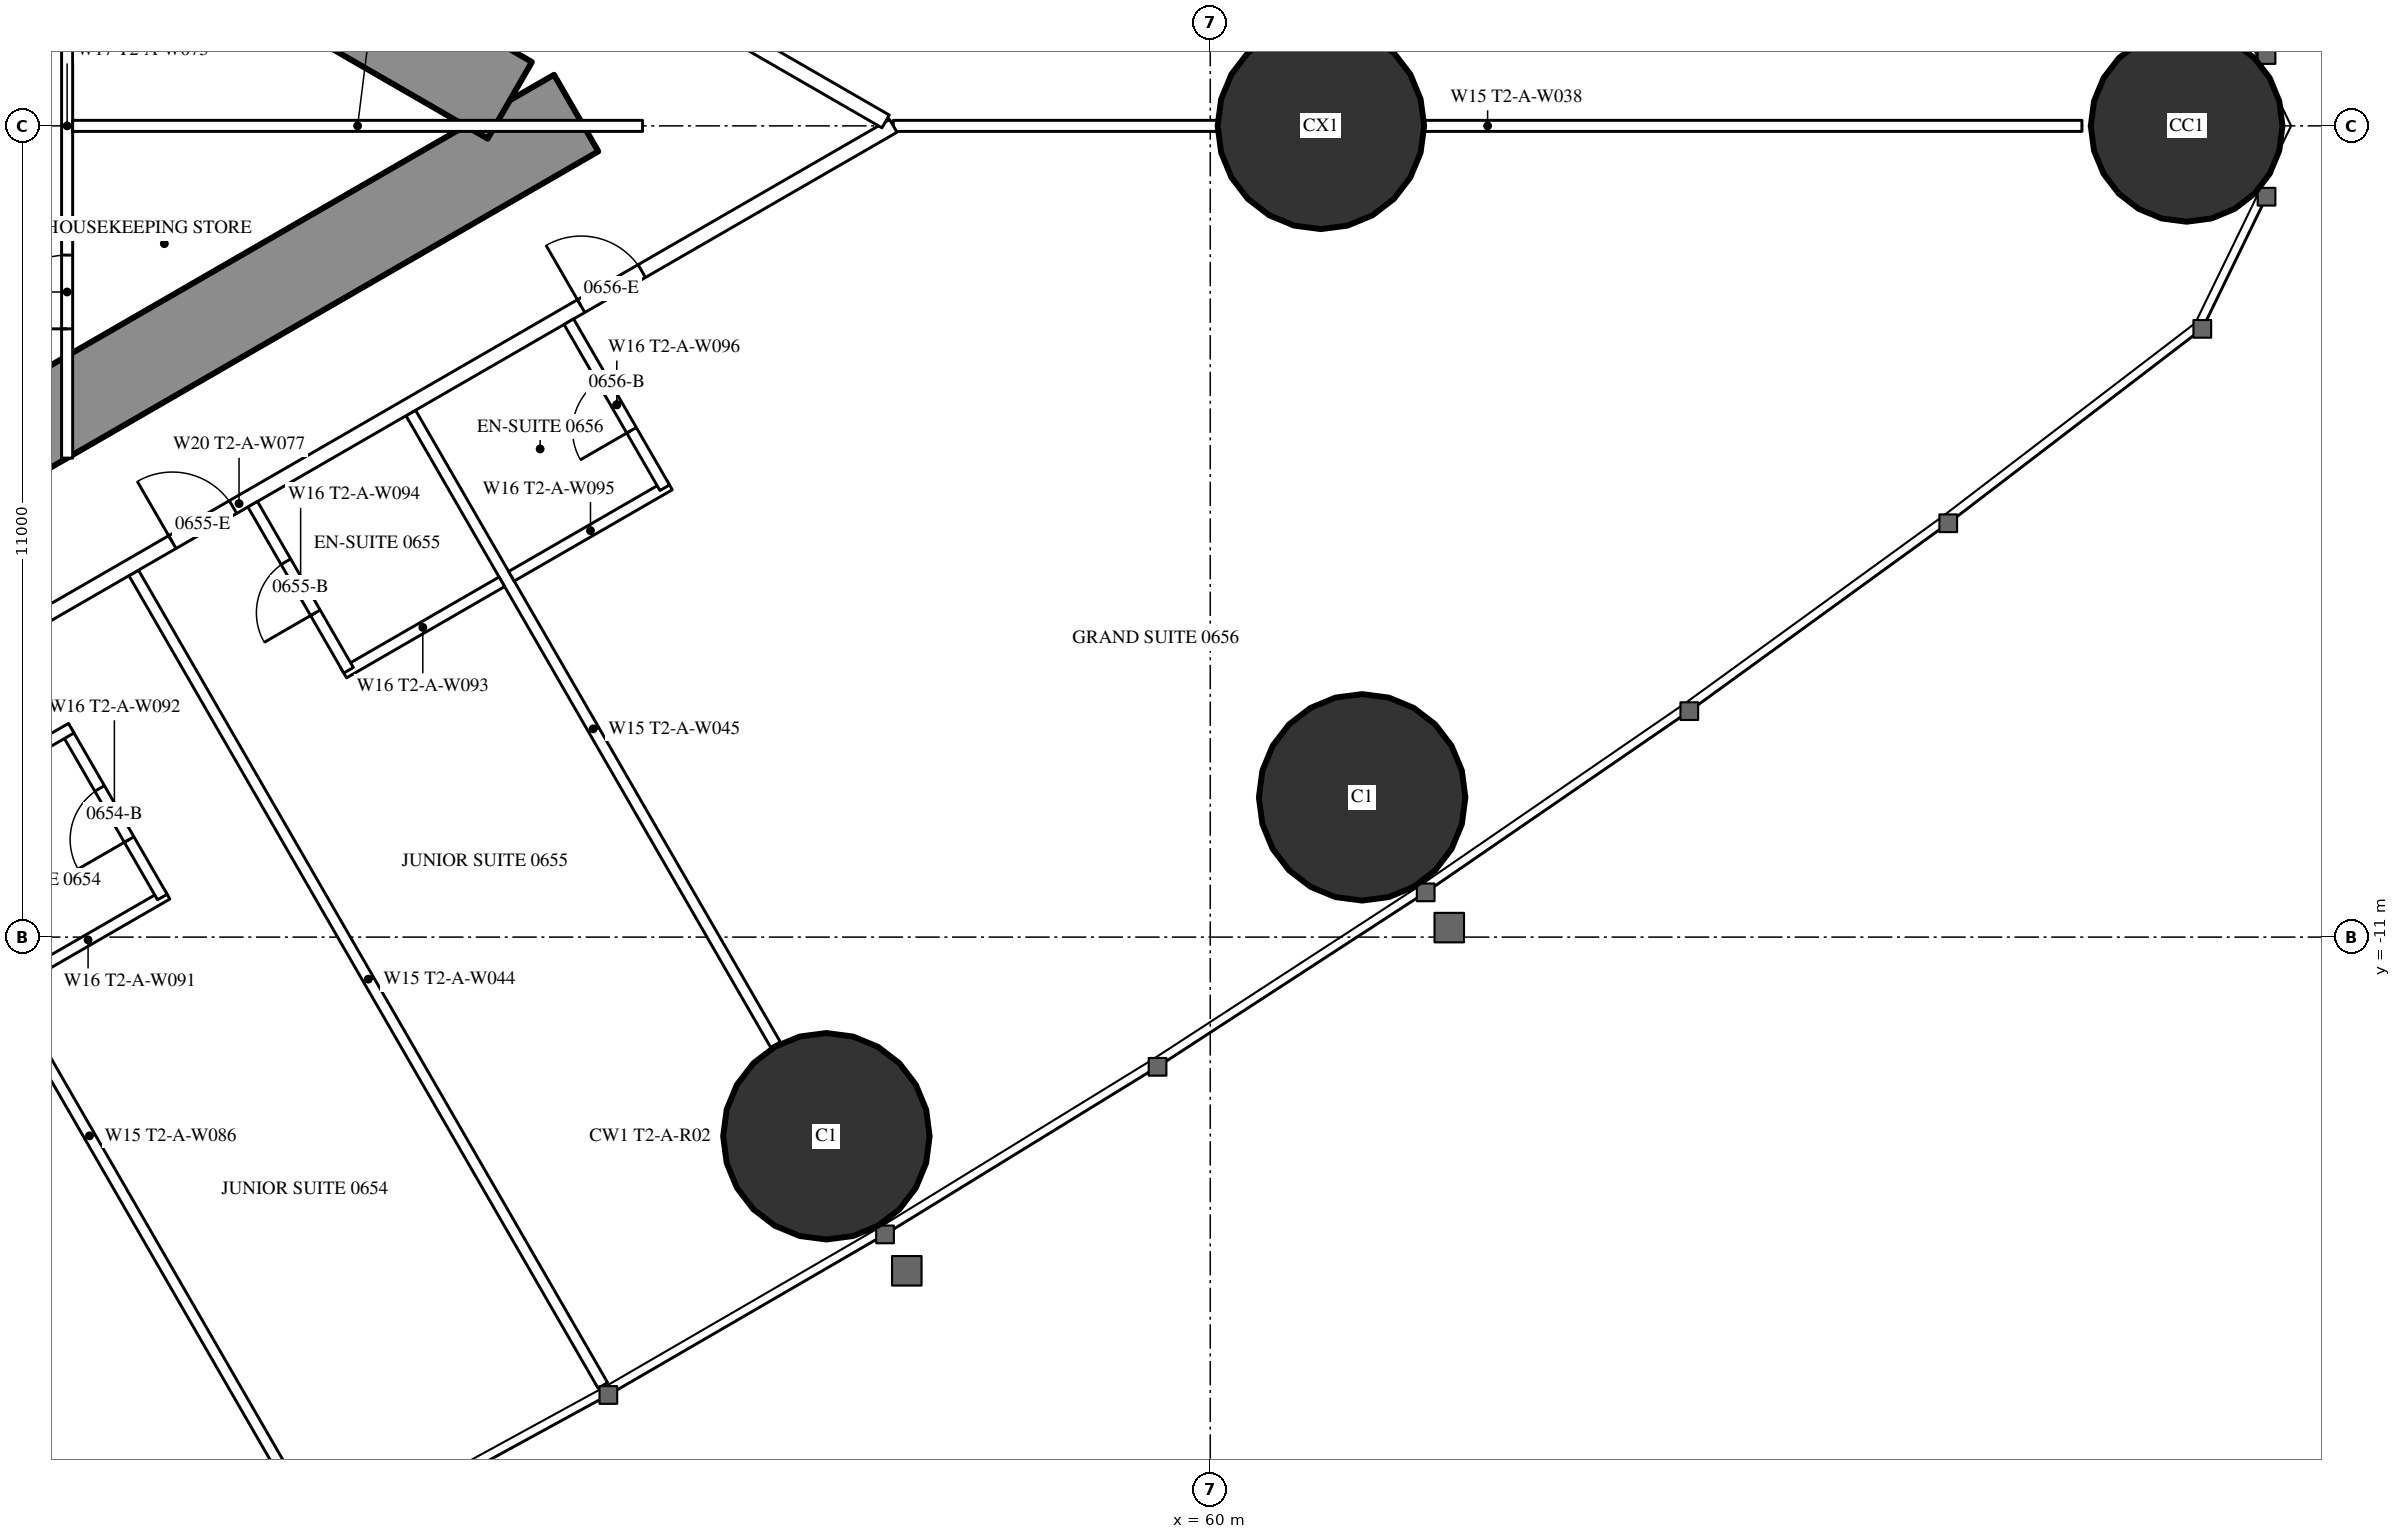
"""IFC4 building model, lengths in metres.
Left out: names, types, materials, properties, quantities, classifications, styles, units other than length and angle.
Written with IfcOpenShell. Run it as: python <this file> out.ifc"""

import sys

from ifc_helpers import new_model, si_unit, direction, frame, frame_2d, origin, origin_2d, place, context, subcontext, project, spatial, rectangle, hollow_circle, extrude, element, fill, save


model = new_model("IFC4")
c1 = context("Model", 3, precision=1e-05, world=origin(), true_north=direction((0.0, 1.0)))
c2 = subcontext(c1, "Body", "Model", "MODEL_VIEW")
j1 = project(units=[si_unit("LENGTHUNIT", "METRE"), si_unit("PLANEANGLEUNIT", "RADIAN")], contexts=[c1])
p1 = place(None, origin())
s1 = spatial("IfcSite", under=j1, at=p1, CompositionType="ELEMENT")
p2 = place(p1, origin())
s2 = spatial("IfcBuilding", under=s1, at=p2, CompositionType="ELEMENT")
p3 = place(p2, frame((0.0, 0.0, 28.5)))
s3 = spatial("IfcBuildingStorey", under=s2, at=p3, CompositionType="ELEMENT", Elevation=28.5)
p4 = place(p3, frame((73.239, 0.0, 0.0), z_axis=(0.0, 0.0, 1.0), x_axis=(1.0, 0.0, 0.0)))
e1 = element("IfcColumn", 1, at=p4, inside=s3, PredefinedType="COLUMN", context=c2, shape_type="SweptSolid", body=[
    extrude(hollow_circle(Radius=1.3, WallThickness=0.1, at=origin_2d()), origin(), (0.0, 0.0, 1.0), 3.5),
])
for number, where, z_axis, x_axis in (
    (2, (54.795, -13.701, 0.0), (0.0, 0.0, 1.0), (1.0, 0.0, 0.0)),
    (3, (62.059, -9.105, 0.0), (0.0, 0.0, 1.0), (1.0, 0.0, 0.0)),
):
    element("IfcColumn", number, at=place(p3, frame(where, z_axis=z_axis, x_axis=x_axis)), inside=s3, PredefinedType="COLUMN", context=c2, shape_type="SweptSolid", body=[
        extrude(hollow_circle(Radius=1.4, WallThickness=0.12, at=origin_2d()), origin(), (0.0, 0.0, 1.0), 3.5),
    ])
p5 = place(p3, frame((61.5, 0.0, 0.0), z_axis=(0.0, 0.0, 1.0), x_axis=(1.0, 0.0, 0.0)))
e4 = element("IfcColumn", 4, at=p5, inside=s3, PredefinedType="COLUMN", context=c2, shape_type="SweptSolid", body=[
    extrude(hollow_circle(Radius=1.4, WallThickness=0.1, at=origin_2d()), origin(), (0.0, 0.0, 1.0), 3.5),
])
p6 = place(p3, frame((27.2, -13.8, 0.0), z_axis=(0.0, 0.0, 1.0), x_axis=(0.866027159892, 0.499996958321, 0.0)))
e5 = element("IfcWall", 5, at=p6, inside=s3, PredefinedType="SHEAR", context=c2, shape_type="SweptSolid", body=[
    extrude(rectangle(XDim=27.947, YDim=1.2, at=frame_2d((13.973, 0.0))), origin(), (0.0, 0.0, 1.0), 3.5),
])
p7 = place(p6, frame((4.6, 0.0, 0.0)))
e6 = element("IfcOpeningElement", 6, at=p7, cuts=e5, PredefinedType="OPENING", context=c2, shape_type="SweptSolid", body=[
    extrude(rectangle(XDim=1.0, YDim=2.2, at=frame_2d((0.5, 1.1))), frame((0.0, 0.61, 0.0), z_axis=(0.0, -1.0, 0.0), x_axis=(1.0, 0.0, 0.0)), (0.0, 0.0, 1.0), 1.22),
])
p8 = place(p6, frame((13.395, 0.0, 0.0)))
e7 = element("IfcOpeningElement", 7, at=p8, cuts=e5, PredefinedType="OPENING", context=c2, shape_type="SweptSolid", body=[
    extrude(rectangle(XDim=1.8, YDim=2.2, at=frame_2d((0.9, 1.1))), frame((0.0, 0.61, 0.0), z_axis=(0.0, -1.0, 0.0), x_axis=(1.0, 0.0, 0.0)), (0.0, 0.0, 1.0), 1.22),
])
p9 = place(p3, frame((27.2, 13.8, 0.0), z_axis=(0.0, 0.0, 1.0), x_axis=(0.866024515034, -0.500001539357, 0.0)))
e8 = element("IfcWall", 8, at=p9, inside=s3, PredefinedType="SHEAR", context=c2, shape_type="SweptSolid", body=[
    extrude(rectangle(XDim=26.907, YDim=1.2, at=frame_2d((13.454, 0.0))), origin(), (0.0, 0.0, 1.0), 3.5),
])
p10 = place(p9, frame((4.6, 0.0, 0.0)))
e9 = element("IfcOpeningElement", 9, at=p10, cuts=e8, PredefinedType="OPENING", context=c2, shape_type="SweptSolid", body=[
    extrude(rectangle(XDim=1.0, YDim=2.2, at=frame_2d((0.5, 1.1))), frame((0.0, 0.61, 0.0), z_axis=(0.0, -1.0, 0.0), x_axis=(1.0, 0.0, 0.0)), (0.0, 0.0, 1.0), 1.22),
])
p11 = place(p9, frame((13.395, 0.0, 0.0)))
e10 = element("IfcOpeningElement", 10, at=p11, cuts=e8, PredefinedType="OPENING", context=c2, shape_type="SweptSolid", body=[
    extrude(rectangle(XDim=1.8, YDim=2.2, at=frame_2d((0.9, 1.1))), frame((0.0, 0.61, 0.0), z_axis=(0.0, -1.0, 0.0), x_axis=(1.0, 0.0, 0.0)), (0.0, 0.0, 1.0), 1.22),
])
p12 = place(p3, frame((41.647, -8.23, 0.0), z_axis=(0.0, 0.0, 1.0), x_axis=(0.49998590462, -0.866033541603, 0.0)))
e11 = element("IfcWall", 11, at=p12, inside=s3, PredefinedType="PARTITIONING", context=c2, shape_type="SweptSolid", body=[
    extrude(rectangle(XDim=12.621, YDim=0.15, at=frame_2d((6.311, 0.0))), origin(), (0.0, 0.0, 1.0), 3.25),
])
p13 = place(p3, frame((45.403, -6.062, 0.0), z_axis=(0.0, 0.0, 1.0), x_axis=(0.500007077968, -0.866021317279, 0.0)))
e12 = element("IfcWall", 12, at=p13, inside=s3, PredefinedType="PARTITIONING", context=c2, shape_type="SweptSolid", body=[
    extrude(rectangle(XDim=12.721, YDim=0.15, at=frame_2d((6.361, 0.0))), origin(), (0.0, 0.0, 1.0), 3.25),
])
p14 = place(p3, frame((49.159, -3.893, 0.0), z_axis=(0.0, 0.0, 1.0), x_axis=(0.499998773722, -0.866026111775, 0.0)))
e13 = element("IfcWall", 13, at=p14, inside=s3, PredefinedType="PARTITIONING", context=c2, shape_type="SweptSolid", body=[
    extrude(rectangle(XDim=9.892, YDim=0.15, at=frame_2d((4.946, 0.0))), origin(), (0.0, 0.0, 1.0), 2.25),
])
p15 = place(p3, frame((55.702, 0.0, 0.0), z_axis=(0.0, 0.0, 1.0), x_axis=(1.0, 0.0, 0.0)))
e14 = element("IfcWall", 14, at=p15, inside=s3, PredefinedType="PARTITIONING", context=c2, shape_type="SweptSolid", body=[
    extrude(rectangle(XDim=16.117, YDim=0.15, at=frame_2d((8.059, 0.0))), origin(), (0.0, 0.0, 1.0), 2.25),
])
p16 = place(p3, frame((37.96, -10.243, 0.0), z_axis=(0.0, 0.0, 1.0), x_axis=(0.866026429433, 0.499998223521, 0.0)))
e15 = element("IfcWall", 15, at=p16, inside=s3, PredefinedType="PARTITIONING", context=c2, shape_type="SweptSolid", body=[
    extrude(rectangle(XDim=20.487, YDim=0.2, at=frame_2d((10.243, 0.0))), origin(), (0.0, 0.0, 1.0), 3.25),
])
p17 = place(p16, frame((4.575, 0.0, 0.0)))
e16 = element("IfcOpeningElement", 16, at=p17, cuts=e15, PredefinedType="OPENING", context=c2, shape_type="SweptSolid", body=[
    extrude(rectangle(XDim=0.95, YDim=2.2, at=frame_2d((0.475, 1.1))), frame((0.0, 0.11, 0.0), z_axis=(0.0, -1.0, 0.0), x_axis=(1.0, 0.0, 0.0)), (0.0, 0.0, 1.0), 0.22),
])
p18 = place(p16, frame((9.199, 0.0, 0.0)))
e17 = element("IfcOpeningElement", 17, at=p18, cuts=e15, PredefinedType="OPENING", context=c2, shape_type="SweptSolid", body=[
    extrude(rectangle(XDim=0.95, YDim=2.2, at=frame_2d((0.475, 1.1))), frame((0.0, 0.11, 0.0), z_axis=(0.0, -1.0, 0.0), x_axis=(1.0, 0.0, 0.0)), (0.0, 0.0, 1.0), 0.22),
])
p19 = place(p16, frame((15.599, 0.0, 0.0)))
e18 = element("IfcOpeningElement", 18, at=p19, cuts=e15, PredefinedType="OPENING", context=c2, shape_type="SweptSolid", body=[
    extrude(rectangle(XDim=0.95, YDim=2.2, at=frame_2d((0.475, 1.1))), frame((0.0, 0.11, 0.0), z_axis=(0.0, -1.0, 0.0), x_axis=(1.0, 0.0, 0.0)), (0.0, 0.0, 1.0), 0.22),
])
p20 = place(p16, frame((2.875, 0.0, 0.0)))
e19 = element("IfcOpeningElement", 19, at=p20, cuts=e15, PredefinedType="OPENING", context=c2, shape_type="SweptSolid", body=[
    extrude(rectangle(XDim=0.95, YDim=2.2, at=frame_2d((0.475, 1.1))), frame((0.0, 0.11, 0.0), z_axis=(0.0, -1.0, 0.0), x_axis=(1.0, 0.0, 0.0)), (0.0, 0.0, 1.0), 0.22),
])
p21 = place(p3, frame((41.619, 8.131, 0.0), z_axis=(0.0, 0.0, 1.0), x_axis=(0.86603245327, -0.499987789734, 0.0)))
e20 = element("IfcWall", 20, at=p21, inside=s3, PredefinedType="PARTITIONING", context=c2, shape_type="SweptSolid", body=[
    extrude(rectangle(XDim=16.142, YDim=0.2, at=frame_2d((8.071, 0.0))), origin(), (0.0, 0.0, 1.0), 3.25),
])
p22 = place(p21, frame((9.024, 0.0, 0.0)))
e21 = element("IfcOpeningElement", 21, at=p22, cuts=e20, PredefinedType="OPENING", context=c2, shape_type="SweptSolid", body=[
    extrude(rectangle(XDim=0.95, YDim=2.2, at=frame_2d((0.475, 1.1))), frame((0.0, 0.11, 0.0), z_axis=(0.0, -1.0, 0.0), x_axis=(1.0, 0.0, 0.0)), (0.0, 0.0, 1.0), 0.22),
])
p23 = place(p21, frame((7.037, 0.0, 0.0)))
e22 = element("IfcOpeningElement", 22, at=p23, cuts=e20, PredefinedType="OPENING", context=c2, shape_type="SweptSolid", body=[
    extrude(rectangle(XDim=0.95, YDim=2.2, at=frame_2d((0.475, 1.1))), frame((0.0, 0.11, 0.0), z_axis=(0.0, -1.0, 0.0), x_axis=(1.0, 0.0, 0.0)), (0.0, 0.0, 1.0), 0.22),
])
p24 = place(p21, frame((2.987, 0.0, 0.0)))
e23 = element("IfcOpeningElement", 23, at=p24, cuts=e20, PredefinedType="OPENING", context=c2, shape_type="SweptSolid", body=[
    extrude(rectangle(XDim=0.95, YDim=2.2, at=frame_2d((0.475, 1.1))), frame((0.0, 0.11, 0.0), z_axis=(0.0, -1.0, 0.0), x_axis=(1.0, 0.0, 0.0)), (0.0, 0.0, 1.0), 0.22),
])
p25 = place(p3, frame((43.712, -11.657, 0.0), z_axis=(0.0, 0.0, 1.0), x_axis=(0.866006523861, 0.500032699561, 0.0)))
e24 = element("IfcWall", 24, at=p25, inside=s3, PredefinedType="PARTITIONING", context=c2, shape_type="SweptSolid", body=[
    extrude(rectangle(XDim=2.475, YDim=0.15, at=frame_2d((1.237, 0.0))), origin(), (0.0, 0.0, 1.0), 3.25),
])
p26 = place(p3, frame((44.491, -8.205, 0.0), z_axis=(0.0, 0.0, 1.0), x_axis=(0.500047596559, -0.865997922154, 0.0)))
e25 = element("IfcWall", 25, at=p26, inside=s3, PredefinedType="PARTITIONING", context=c2, shape_type="SweptSolid", body=[
    extrude(rectangle(XDim=2.6, YDim=0.15, at=frame_2d((1.3, 0.0))), origin(), (0.0, 0.0, 1.0), 3.25),
])
p27 = place(p26, frame((0.9, 0.0, 0.0)))
e26 = element("IfcOpeningElement", 26, at=p27, cuts=e25, PredefinedType="OPENING", context=c2, shape_type="SweptSolid", body=[
    extrude(rectangle(XDim=0.8, YDim=2.2, at=frame_2d((0.4, 1.1))), frame((0.0, 0.085, 0.0), z_axis=(0.0, -1.0, 0.0), x_axis=(1.0, 0.0, 0.0)), (0.0, 0.0, 1.0), 0.17),
])
for number, where, z_axis, x_axis in (
    (27, (42.412, -9.405, 0.0), (0.0, 0.0, 1.0), (0.866, 0.5, 0.0)),
    (28, (48.251, -7.42, 0.0), (0.0, 0.0, 1.0), (0.866, 0.5, 0.0)),
):
    element("IfcWall", number, at=place(p3, frame(where, z_axis=z_axis, x_axis=x_axis)), inside=s3, PredefinedType="PARTITIONING", context=c2, shape_type="SweptSolid", body=[
        extrude(rectangle(XDim=2.475, YDim=0.15, at=frame_2d((1.237, 0.0))), origin(), (0.0, 0.0, 1.0), 3.25),
    ])
p28 = place(p3, frame((47.016, -5.13, 0.0), z_axis=(0.0, 0.0, 1.0), x_axis=(0.500006934395, -0.866021400173, 0.0)))
e29 = element("IfcWall", 29, at=p28, inside=s3, PredefinedType="PARTITIONING", context=c2, shape_type="SweptSolid", body=[
    extrude(rectangle(XDim=2.6, YDim=0.15, at=frame_2d((1.3, 0.0))), origin(), (0.0, 0.0, 1.0), 3.25),
])
p29 = place(p28, frame((0.9, 0.0, 0.0)))
e30 = element("IfcOpeningElement", 30, at=p29, cuts=e29, PredefinedType="OPENING", context=c2, shape_type="SweptSolid", body=[
    extrude(rectangle(XDim=0.8, YDim=2.2, at=frame_2d((0.4, 1.1))), frame((0.0, 0.085, 0.0), z_axis=(0.0, -1.0, 0.0), x_axis=(1.0, 0.0, 0.0)), (0.0, 0.0, 1.0), 0.17),
])
p30 = place(p3, frame((50.524, -6.107, 0.0), z_axis=(0.0, 0.0, 1.0), x_axis=(0.866031185235, 0.4999899861, 0.0)))
e31 = element("IfcWall", 31, at=p30, inside=s3, PredefinedType="PARTITIONING", context=c2, shape_type="SweptSolid", body=[
    extrude(rectangle(XDim=2.475, YDim=0.15, at=frame_2d((1.238, 0.0))), origin(), (0.0, 0.0, 1.0), 3.25),
])
p31 = place(p3, frame((51.303, -2.656, 0.0), z_axis=(0.0, 0.0, 1.0), x_axis=(0.500047596559, -0.865997922154, 0.0)))
e32 = element("IfcWall", 32, at=p31, inside=s3, PredefinedType="PARTITIONING", context=c2, shape_type="SweptSolid", body=[
    extrude(rectangle(XDim=2.6, YDim=0.15, at=frame_2d((1.3, 0.0))), origin(), (0.0, 0.0, 1.0), 3.25),
])
p32 = place(p31, frame((0.9, 0.0, 0.0)))
e33 = element("IfcOpeningElement", 33, at=p32, cuts=e32, PredefinedType="OPENING", context=c2, shape_type="SweptSolid", body=[
    extrude(rectangle(XDim=0.8, YDim=2.2, at=frame_2d((0.4, 1.1))), frame((0.0, 0.085, 0.0), z_axis=(0.0, -1.0, 0.0), x_axis=(1.0, 0.0, 0.0)), (0.0, 0.0, 1.0), 0.17),
])
p33 = place(p3, frame((44.5, -4.505, 0.0), z_axis=(0.0, 0.0, 1.0), x_axis=(0.0, 1.0, 0.0)))
e34 = element("IfcWall", 34, at=p33, inside=s3, PredefinedType="PARTITIONING", context=c2, shape_type="SweptSolid", body=[
    extrude(rectangle(XDim=9.009, YDim=0.15, at=frame_2d((4.505, 0.0))), origin(), (0.0, 0.0, 1.0), 2.45),
])
p34 = place(p33, frame((1.752, 0.0, 0.0)))
e35 = element("IfcOpeningElement", 35, at=p34, cuts=e34, PredefinedType="OPENING", context=c2, shape_type="SweptSolid", body=[
    extrude(rectangle(XDim=1.0, YDim=2.2, at=frame_2d((0.5, 1.1))), frame((0.0, 0.085, 0.0), z_axis=(0.0, -1.0, 0.0), x_axis=(1.0, 0.0, 0.0)), (0.0, 0.0, 1.0), 0.17),
])
p35 = place(p33, frame((6.257, 0.0, 0.0)))
e36 = element("IfcOpeningElement", 36, at=p35, cuts=e34, PredefinedType="OPENING", context=c2, shape_type="SweptSolid", body=[
    extrude(rectangle(XDim=1.0, YDim=2.2, at=frame_2d((0.5, 1.1))), frame((0.0, 0.085, 0.0), z_axis=(0.0, -1.0, 0.0), x_axis=(1.0, 0.0, 0.0)), (0.0, 0.0, 1.0), 0.17),
])
p36 = place(p3, frame((44.575, 0.0, 0.0), z_axis=(0.0, 0.0, 1.0), x_axis=(1.0, 0.0, 0.0)))
e37 = element("IfcWall", 37, at=p36, inside=s3, PredefinedType="PARTITIONING", context=c2, shape_type="SweptSolid", body=[
    extrude(rectangle(XDim=7.727, YDim=0.15, at=frame_2d((3.864, 0.0))), origin(), (0.0, 0.0, 1.0), 2.25),
])
p37 = place(p27, origin())
e38 = element("IfcDoor", 38, at=p37, inside=s3, OperationType="SINGLE_SWING_RIGHT", PredefinedType="DOOR", context=c2, shape_type="SweptSolid", body=[
    extrude(rectangle(XDim=0.8, YDim=2.2, at=frame_2d((0.4, 1.1))), frame((0.0, 0.025, 0.0), z_axis=(0.0, -1.0, 0.0), x_axis=(1.0, 0.0, 0.0)), (0.0, 0.0, 1.0), 0.05),
])
fill(e26, e38)
p38 = place(p29, origin())
e39 = element("IfcDoor", 39, at=p38, inside=s3, OperationType="SINGLE_SWING_RIGHT", PredefinedType="DOOR", context=c2, shape_type="SweptSolid", body=[
    extrude(rectangle(XDim=0.8, YDim=2.2, at=frame_2d((0.4, 1.1))), frame((0.0, 0.025, 0.0), z_axis=(0.0, -1.0, 0.0), x_axis=(1.0, 0.0, 0.0)), (0.0, 0.0, 1.0), 0.05),
])
fill(e30, e39)
p39 = place(p18, origin())
e40 = element("IfcDoor", 40, at=p39, inside=s3, OperationType="SINGLE_SWING_LEFT", PredefinedType="DOOR", context=c2, shape_type="SweptSolid", body=[
    extrude(rectangle(XDim=0.95, YDim=2.2, at=frame_2d((0.475, 1.1))), frame((0.0, 0.025, 0.0), z_axis=(0.0, -1.0, 0.0), x_axis=(1.0, 0.0, 0.0)), (0.0, 0.0, 1.0), 0.05),
])
fill(e17, e40)
p40 = place(p32, origin())
e41 = element("IfcDoor", 41, at=p40, inside=s3, OperationType="SINGLE_SWING_RIGHT", PredefinedType="DOOR", context=c2, shape_type="SweptSolid", body=[
    extrude(rectangle(XDim=0.8, YDim=2.2, at=frame_2d((0.4, 1.1))), frame((0.0, 0.025, 0.0), z_axis=(0.0, -1.0, 0.0), x_axis=(1.0, 0.0, 0.0)), (0.0, 0.0, 1.0), 0.05),
])
fill(e33, e41)
p41 = place(p19, origin())
e42 = element("IfcDoor", 42, at=p41, inside=s3, OperationType="SINGLE_SWING_LEFT", PredefinedType="DOOR", context=c2, shape_type="SweptSolid", body=[
    extrude(rectangle(XDim=0.95, YDim=2.2, at=frame_2d((0.475, 1.1))), frame((0.0, 0.025, 0.0), z_axis=(0.0, -1.0, 0.0), x_axis=(1.0, 0.0, 0.0)), (0.0, 0.0, 1.0), 0.05),
])
fill(e18, e42)
p42 = place(p34, origin())
e43 = element("IfcDoor", 43, at=p42, inside=s3, OperationType="SINGLE_SWING_LEFT", PredefinedType="DOOR", context=c2, shape_type="SweptSolid", body=[
    extrude(rectangle(XDim=1.0, YDim=2.2, at=frame_2d((0.5, 1.1))), frame((0.0, 0.025, 0.0), z_axis=(0.0, -1.0, 0.0), x_axis=(1.0, 0.0, 0.0)), (0.0, 0.0, 1.0), 0.05),
])
fill(e35, e43)
save(model, sys.argv[1])
